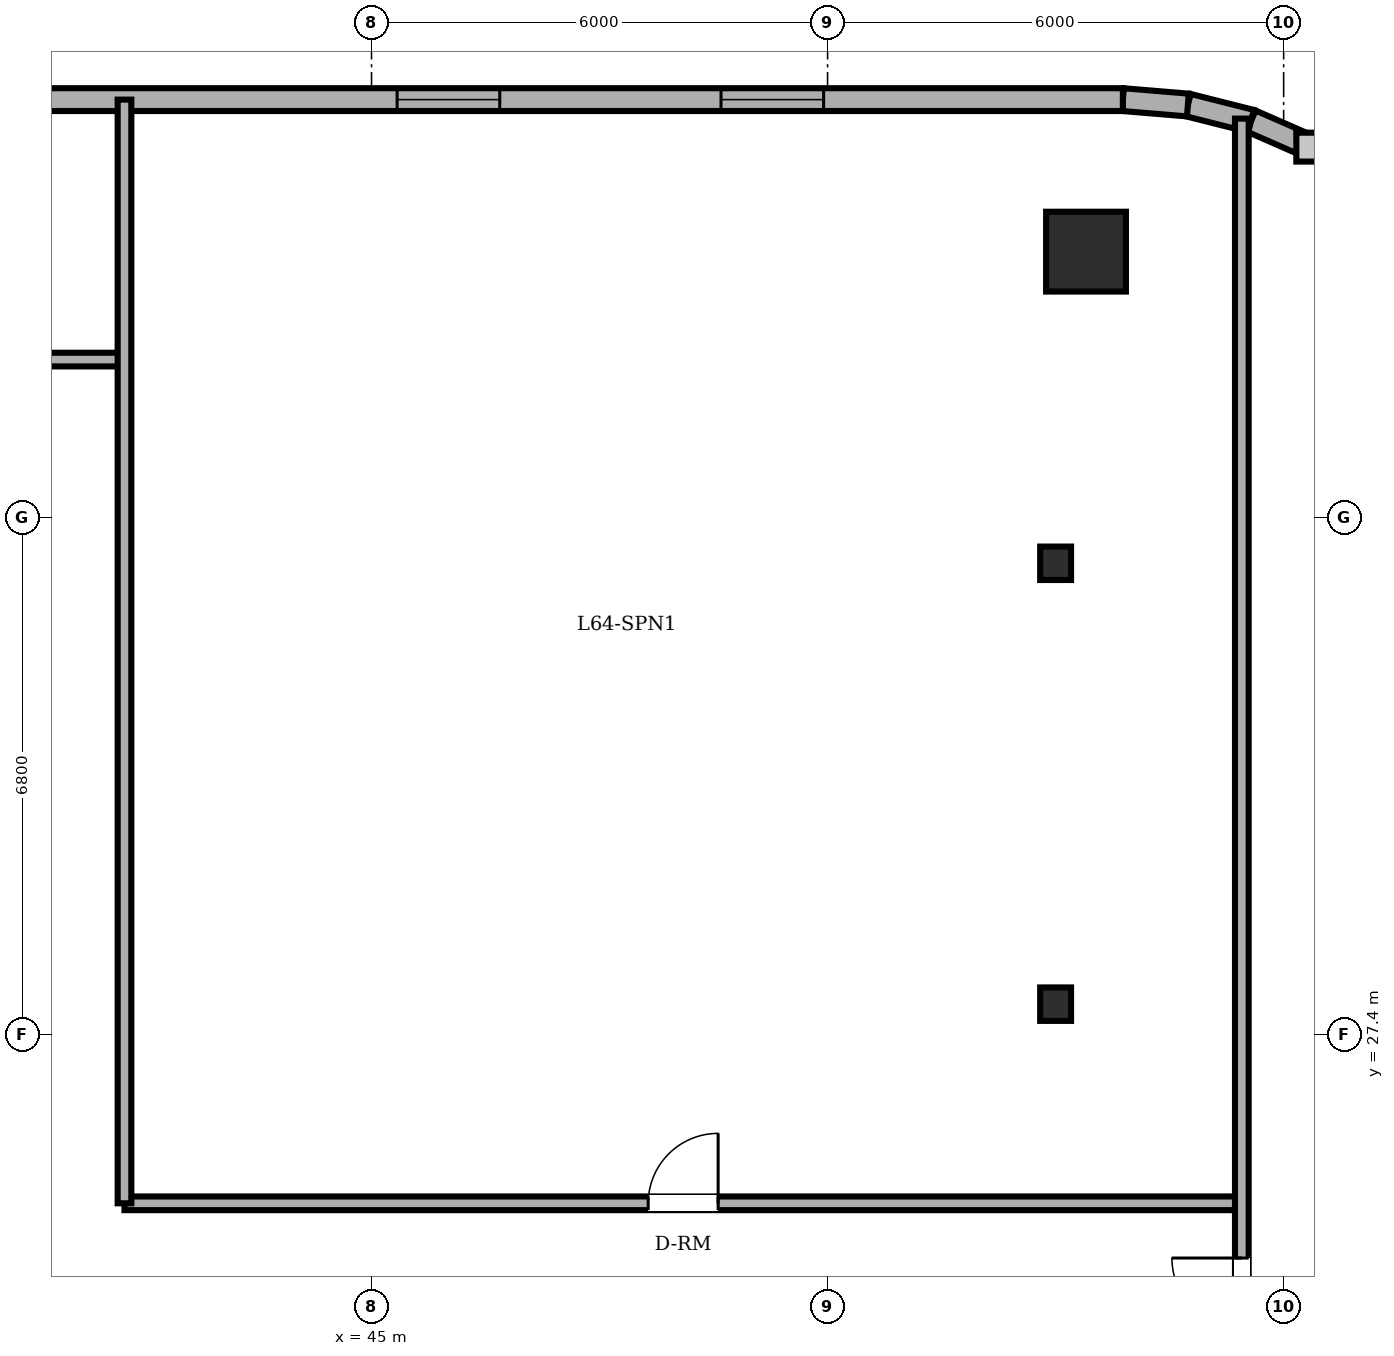
"""IFC4 building model, lengths in metres.
Left out: names, types, materials, properties, quantities, classifications, styles, units other than length and angle.
Written with IfcOpenShell. Run it as: python <this file> out.ifc"""

import sys

from ifc_helpers import new_model, si_unit, direction, frame, frame_2d, origin, origin_2d, place, context, subcontext, project, spatial, rectangle, circle, i_section, extrude, element, fill, save


model = new_model("IFC4")
c1 = context("Model", 3, precision=1e-05, world=origin(), true_north=direction((0.0, 1.0)))
c2 = subcontext(c1, "Body", "Model", "MODEL_VIEW")
j1 = project(units=[si_unit("LENGTHUNIT", "METRE"), si_unit("PLANEANGLEUNIT", "RADIAN")], contexts=[c1])
p1 = place(None, origin())
s1 = spatial("IfcSite", under=j1, at=p1, CompositionType="ELEMENT")
p2 = place(p1, origin())
s2 = spatial("IfcBuilding", under=s1, at=p2, CompositionType="ELEMENT")
p3 = place(p2, frame((0.0, 0.0, 244.5)))
s3 = spatial("IfcBuildingStorey", under=s2, at=p3, CompositionType="ELEMENT", Elevation=244.5)
p4 = place(p3, frame((54.4, 37.7, 0.0), z_axis=(0.0, 0.0, 1.0), x_axis=(1.0, 0.0, 0.0)))
e1 = element("IfcColumn", 1, at=p4, inside=s3, PredefinedType="COLUMN", context=c2, shape_type="SweptSolid", body=[
    extrude(circle(Radius=0.525, at=origin_2d()), origin(), (0.0, 0.0, 1.0), 3.6),
])
for number, where, z_axis, x_axis in (
    (2, (54.0, 27.8, 0.0), (0.0, 0.0, 1.0), (1.0, 0.0, 0.0)),
    (3, (54.0, 33.6, 0.0), (0.0, 0.0, 1.0), (1.0, 0.0, 0.0)),
):
    element("IfcColumn", number, at=place(p3, frame(where, z_axis=z_axis, x_axis=x_axis)), inside=s3, PredefinedType="COLUMN", context=c2, shape_type="SweptSolid", body=[
        extrude(i_section(OverallWidth=0.406, OverallDepth=0.44, WebThickness=0.024, FlangeThickness=0.039, FilletRadius=0.015, at=origin_2d()), origin(), (0.0, 0.0, 1.0), 3.6),
    ])
p5 = place(p3, frame((57.357, 39.075, 0.0), z_axis=(0.0, 0.0, 1.0), x_axis=(-0.916085473636, 0.400983048261, 0.0)))
e4 = element("IfcWall", 4, at=p5, inside=s3, PredefinedType="SOLIDWALL", context=c2, shape_type="SweptSolid", body=[
    extrude(rectangle(XDim=0.858, YDim=0.3, at=frame_2d((0.429, 0.0))), origin(), (0.0, 0.0, 1.0), 3.36),
])
p6 = place(p3, frame((56.571, 39.419, 0.0), z_axis=(0.0, 0.0, 1.0), x_axis=(-0.969536346338, 0.244947490555, 0.0)))
e5 = element("IfcWall", 5, at=p6, inside=s3, PredefinedType="SOLIDWALL", context=c2, shape_type="SweptSolid", body=[
    extrude(rectangle(XDim=0.857, YDim=0.3, at=frame_2d((0.429, 0.0))), origin(), (0.0, 0.0, 1.0), 3.36),
])
p7 = place(p3, frame((55.74, 39.629, 0.0), z_axis=(0.0, 0.0, 1.0), x_axis=(-0.996565355958, 0.082809971041, 0.0)))
e6 = element("IfcWall", 6, at=p7, inside=s3, PredefinedType="SOLIDWALL", context=c2, shape_type="SweptSolid", body=[
    extrude(rectangle(XDim=0.858, YDim=0.3, at=frame_2d((0.429, 0.0))), origin(), (0.0, 0.0, 1.0), 3.36),
])
p8 = place(p3, frame((54.885, 39.7, 0.0), z_axis=(0.0, 0.0, 1.0), x_axis=(-1.0, 0.0, 0.0)))
e7 = element("IfcWall", 7, at=p8, inside=s3, PredefinedType="SOLIDWALL", context=c2, shape_type="SweptSolid", body=[
    extrude(rectangle(XDim=32.485, YDim=0.3, at=frame_2d((16.243, 0.0))), origin(), (0.0, 0.0, 1.0), 3.36),
])
p9 = place(p8, frame((18.01, 0.0, 0.0)))
e8 = element("IfcOpeningElement", 8, at=p9, cuts=e7, PredefinedType="OPENING", context=c2, shape_type="SweptSolid", body=[
    extrude(rectangle(XDim=0.95, YDim=2.2, at=frame_2d((0.475, 1.1))), frame((0.0, 0.16, 0.0), z_axis=(0.0, -1.0, 0.0), x_axis=(1.0, 0.0, 0.0)), (0.0, 0.0, 1.0), 0.32),
])
p10 = place(p8, frame((3.937, 0.0, 0.85)))
e9 = element("IfcOpeningElement", 9, at=p10, cuts=e7, PredefinedType="OPENING", context=c2, shape_type="SweptSolid", body=[
    extrude(rectangle(XDim=1.35, YDim=1.55, at=frame_2d((0.675, 0.775))), frame((0.0, 0.16, 0.0), z_axis=(0.0, -1.0, 0.0), x_axis=(1.0, 0.0, 0.0)), (0.0, 0.0, 1.0), 0.32),
])
p11 = place(p8, frame((8.198, 0.0, 0.85)))
e10 = element("IfcOpeningElement", 10, at=p11, cuts=e7, PredefinedType="OPENING", context=c2, shape_type="SweptSolid", body=[
    extrude(rectangle(XDim=1.35, YDim=1.55, at=frame_2d((0.675, 0.775))), frame((0.0, 0.16, 0.0), z_axis=(0.0, -1.0, 0.0), x_axis=(1.0, 0.0, 0.0)), (0.0, 0.0, 1.0), 0.32),
])
p12 = place(p8, frame((15.31, 0.0, 0.85)))
e11 = element("IfcOpeningElement", 11, at=p12, cuts=e7, PredefinedType="OPENING", context=c2, shape_type="SweptSolid", body=[
    extrude(rectangle(XDim=1.35, YDim=1.55, at=frame_2d((0.675, 0.775))), frame((0.0, 0.16, 0.0), z_axis=(0.0, -1.0, 0.0), x_axis=(1.0, 0.0, 0.0)), (0.0, 0.0, 1.0), 0.32),
])
p13 = place(p8, frame((22.91, 0.0, 0.85)))
e12 = element("IfcOpeningElement", 12, at=p13, cuts=e7, PredefinedType="OPENING", context=c2, shape_type="SweptSolid", body=[
    extrude(rectangle(XDim=1.35, YDim=1.55, at=frame_2d((0.675, 0.775))), frame((0.0, 0.16, 0.0), z_axis=(0.0, -1.0, 0.0), x_axis=(1.0, 0.0, 0.0)), (0.0, 0.0, 1.0), 0.32),
])
p14 = place(p8, frame((26.51, 0.0, 0.85)))
e13 = element("IfcOpeningElement", 13, at=p14, cuts=e7, PredefinedType="OPENING", context=c2, shape_type="SweptSolid", body=[
    extrude(rectangle(XDim=1.35, YDim=1.55, at=frame_2d((0.675, 0.775))), frame((0.0, 0.16, 0.0), z_axis=(0.0, -1.0, 0.0), x_axis=(1.0, 0.0, 0.0)), (0.0, 0.0, 1.0), 0.32),
])
p15 = place(p8, frame((29.835, 0.0, 0.85)))
e14 = element("IfcOpeningElement", 14, at=p15, cuts=e7, PredefinedType="OPENING", context=c2, shape_type="SweptSolid", body=[
    extrude(rectangle(XDim=1.35, YDim=1.55, at=frame_2d((0.675, 0.775))), frame((0.0, 0.16, 0.0), z_axis=(0.0, -1.0, 0.0), x_axis=(1.0, 0.0, 0.0)), (0.0, 0.0, 1.0), 0.32),
])
p16 = place(p3, frame((41.75, 25.18, 0.0), z_axis=(0.0, 0.0, 1.0), x_axis=(1.0, 0.0, 0.0)))
e15 = element("IfcWall", 15, at=p16, inside=s3, PredefinedType="PARTITIONING", context=c2, shape_type="SweptSolid", body=[
    extrude(rectangle(XDim=14.7, YDim=0.18, at=frame_2d((7.35, 0.0))), origin(), (0.0, 0.0, 1.0), 3.36),
])
p17 = place(p16, frame((6.89, 0.0, 0.0)))
e16 = element("IfcOpeningElement", 16, at=p17, cuts=e15, PredefinedType="OPENING", context=c2, shape_type="SweptSolid", body=[
    extrude(rectangle(XDim=0.92, YDim=2.1, at=frame_2d((0.46, 1.05))), frame((0.0, 0.1, 0.0), z_axis=(0.0, -1.0, 0.0), x_axis=(1.0, 0.0, 0.0)), (0.0, 0.0, 1.0), 0.2),
])
p18 = place(p3, frame((17.677, 36.28, 0.0), z_axis=(0.0, 0.0, 1.0), x_axis=(1.0, 0.0, 0.0)))
e17 = element("IfcWall", 17, at=p18, inside=s3, PredefinedType="PARTITIONING", context=c2, shape_type="SweptSolid", body=[
    extrude(rectangle(XDim=24.073, YDim=0.18, at=frame_2d((12.037, 0.0))), origin(), (0.0, 0.0, 1.0), 3.36),
])
p19 = place(p18, frame((9.573, 0.0, 0.0)))
e18 = element("IfcOpeningElement", 18, at=p19, cuts=e17, PredefinedType="OPENING", context=c2, shape_type="SweptSolid", body=[
    extrude(rectangle(XDim=0.9, YDim=2.1, at=frame_2d((0.45, 1.05))), frame((0.0, 0.1, 0.0), z_axis=(0.0, -1.0, 0.0), x_axis=(1.0, 0.0, 0.0)), (0.0, 0.0, 1.0), 0.2),
])
p20 = place(p18, frame((13.193, 0.0, 0.0)))
e19 = element("IfcOpeningElement", 19, at=p20, cuts=e17, PredefinedType="OPENING", context=c2, shape_type="SweptSolid", body=[
    extrude(rectangle(XDim=0.86, YDim=2.1, at=frame_2d((0.43, 1.05))), frame((0.0, 0.1, 0.0), z_axis=(0.0, -1.0, 0.0), x_axis=(1.0, 0.0, 0.0)), (0.0, 0.0, 1.0), 0.2),
])
p21 = place(p18, frame((4.063, 0.0, 0.0)))
e20 = element("IfcOpeningElement", 20, at=p21, cuts=e17, PredefinedType="OPENING", context=c2, shape_type="SweptSolid", body=[
    extrude(rectangle(XDim=0.92, YDim=2.1, at=frame_2d((0.46, 1.05))), frame((0.0, 0.1, 0.0), z_axis=(0.0, -1.0, 0.0), x_axis=(1.0, 0.0, 0.0)), (0.0, 0.0, 1.0), 0.2),
])
p22 = place(p18, frame((19.038, 0.0, 0.0)))
e21 = element("IfcOpeningElement", 21, at=p22, cuts=e17, PredefinedType="OPENING", context=c2, shape_type="SweptSolid", body=[
    extrude(rectangle(XDim=1.0, YDim=2.15, at=frame_2d((0.5, 1.075))), frame((0.0, 0.1, 0.0), z_axis=(0.0, -1.0, 0.0), x_axis=(1.0, 0.0, 0.0)), (0.0, 0.0, 1.0), 0.2),
])
p23 = place(p3, frame((41.75, 25.18, 0.0), z_axis=(0.0, 0.0, 1.0), x_axis=(0.0, 1.0, 0.0)))
e22 = element("IfcWall", 22, at=p23, inside=s3, PredefinedType="PARTITIONING", context=c2, shape_type="SweptSolid", body=[
    extrude(rectangle(XDim=14.52, YDim=0.18, at=frame_2d((7.26, 0.0))), origin(), (0.0, 0.0, 1.0), 3.36),
])
p24 = place(p3, frame((56.45, 8.55, 0.0), z_axis=(0.0, 0.0, 1.0), x_axis=(0.0, 1.0, 0.0)))
e23 = element("IfcWall", 23, at=p24, inside=s3, PredefinedType="PARTITIONING", context=c2, shape_type="SweptSolid", body=[
    extrude(rectangle(XDim=30.9, YDim=0.18, at=frame_2d((15.45, 0.0))), origin(), (0.0, 0.0, 1.0), 3.36),
])
p25 = place(p24, frame((14.99, 0.0, 0.0)))
e24 = element("IfcOpeningElement", 24, at=p25, cuts=e23, PredefinedType="OPENING", context=c2, shape_type="SweptSolid", body=[
    extrude(rectangle(XDim=0.92, YDim=2.1, at=frame_2d((0.46, 1.05))), frame((0.0, 0.1, 0.0), z_axis=(0.0, -1.0, 0.0), x_axis=(1.0, 0.0, 0.0)), (0.0, 0.0, 1.0), 0.2),
])
p26 = place(p10, origin())
e25 = element("IfcWindow", 25, at=p26, inside=s3, PartitioningType="SINGLE_PANEL", PredefinedType="WINDOW", context=c2, shape_type="SweptSolid", body=[
    extrude(rectangle(XDim=1.35, YDim=1.55, at=frame_2d((0.675, 0.775))), frame((0.0, 0.03, 0.0), z_axis=(0.0, -1.0, 0.0), x_axis=(1.0, 0.0, 0.0)), (0.0, 0.0, 1.0), 0.06),
])
fill(e9, e25)
p27 = place(p11, origin())
e26 = element("IfcWindow", 26, at=p27, inside=s3, PartitioningType="SINGLE_PANEL", PredefinedType="WINDOW", context=c2, shape_type="SweptSolid", body=[
    extrude(rectangle(XDim=1.35, YDim=1.55, at=frame_2d((0.675, 0.775))), frame((0.0, 0.03, 0.0), z_axis=(0.0, -1.0, 0.0), x_axis=(1.0, 0.0, 0.0)), (0.0, 0.0, 1.0), 0.06),
])
fill(e10, e26)
p28 = place(p17, origin())
e27 = element("IfcDoor", 27, at=p28, inside=s3, OperationType="SINGLE_SWING_RIGHT", PredefinedType="DOOR", context=c2, shape_type="SweptSolid", body=[
    extrude(rectangle(XDim=0.92, YDim=2.1, at=frame_2d((0.46, 1.05))), frame((0.0, 0.025, 0.0), z_axis=(0.0, -1.0, 0.0), x_axis=(1.0, 0.0, 0.0)), (0.0, 0.0, 1.0), 0.05),
])
fill(e16, e27)
p29 = place(p25, origin())
e28 = element("IfcDoor", 28, at=p29, inside=s3, OperationType="SINGLE_SWING_RIGHT", PredefinedType="DOOR", context=c2, shape_type="SweptSolid", body=[
    extrude(rectangle(XDim=0.92, YDim=2.1, at=frame_2d((0.46, 1.05))), frame((0.0, 0.025, 0.0), z_axis=(0.0, -1.0, 0.0), x_axis=(1.0, 0.0, 0.0)), (0.0, 0.0, 1.0), 0.05),
])
fill(e24, e28)
save(model, sys.argv[1])
